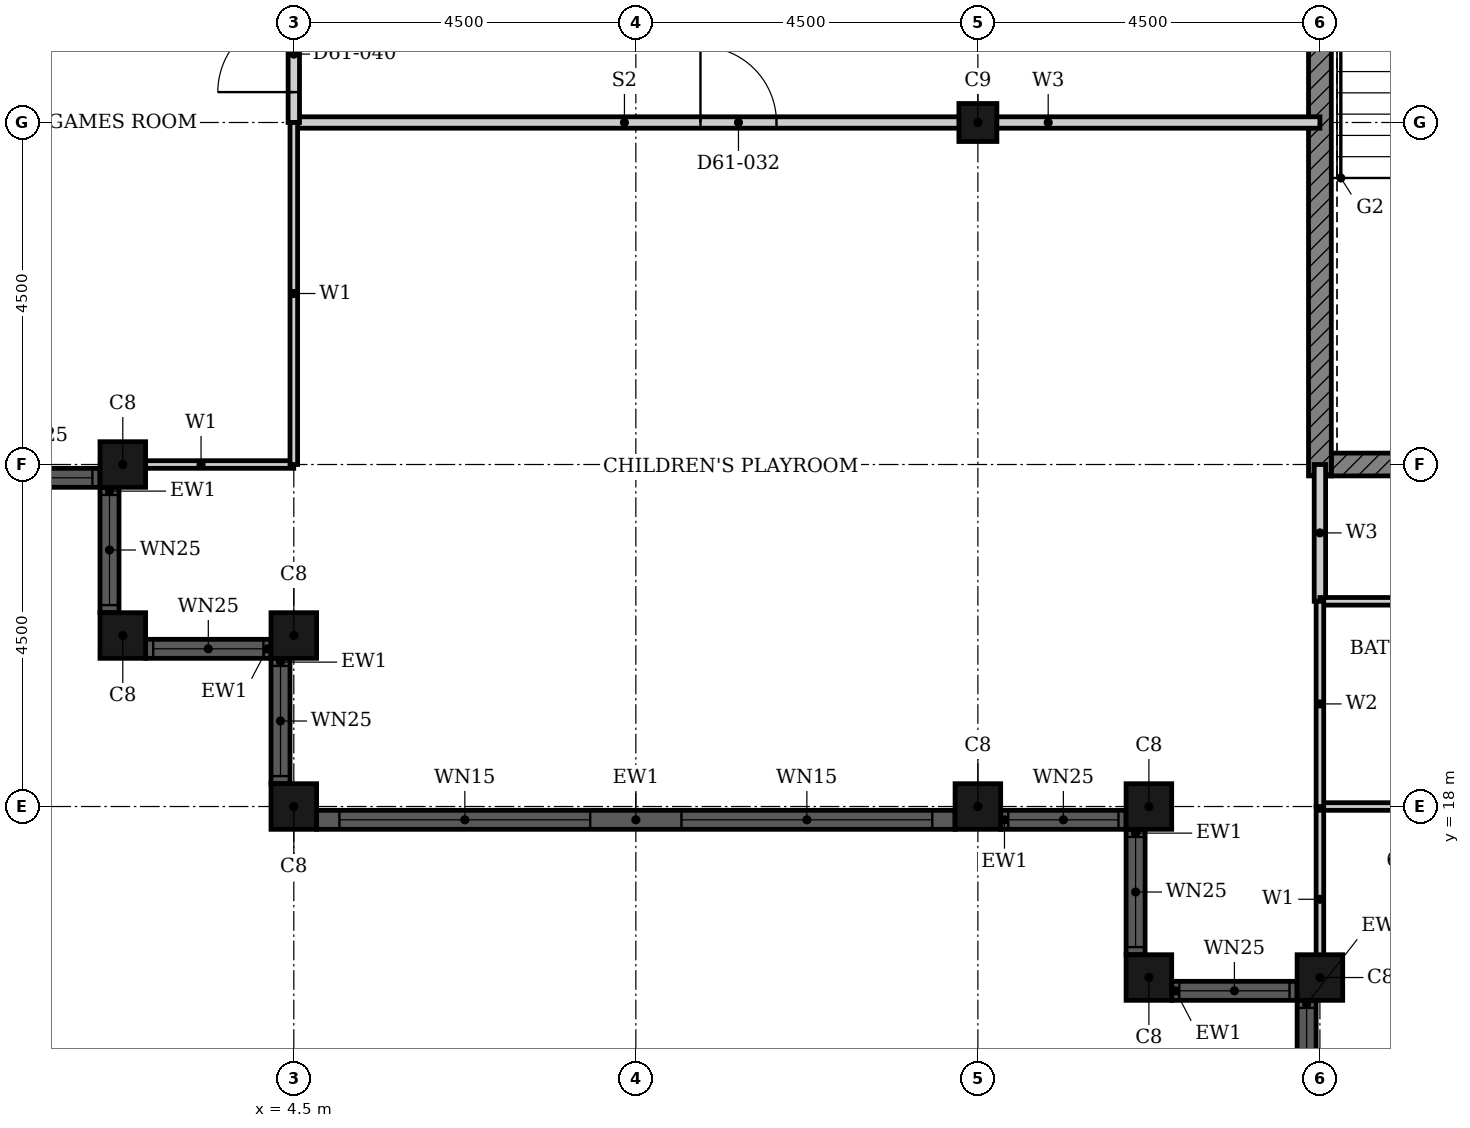
"""IFC4 building model, lengths in metres.
Left out: names, types, materials, properties, quantities, classifications, styles, units other than length and angle.
Written with IfcOpenShell. Run it as: python <this file> out.ifc"""

import sys

from ifc_helpers import new_model, si_unit, direction, frame, frame_2d, origin, origin_2d, place, context, subcontext, project, spatial, rectangle, hollow_rectangle, extrude, element, fill, save


model = new_model("IFC4")
c1 = context("Model", 3, precision=1e-05, world=origin(), true_north=direction((0.0, 1.0)))
c2 = subcontext(c1, "Body", "Model", "MODEL_VIEW")
j1 = project(units=[si_unit("LENGTHUNIT", "METRE"), si_unit("PLANEANGLEUNIT", "RADIAN")], contexts=[c1])
p1 = place(None, origin())
s1 = spatial("IfcSite", under=j1, at=p1, CompositionType="ELEMENT")
p2 = place(p1, origin())
s2 = spatial("IfcBuilding", under=s1, at=p2, CompositionType="ELEMENT")
p3 = place(p2, frame((0.0, 0.0, 241.6)))
s3 = spatial("IfcBuildingStorey", under=s2, at=p3, CompositionType="ELEMENT", Elevation=241.6)
for number, where, z_axis, x_axis in (
    (1, (15.75, 18.0, 0.0), (0.0, 0.0, 1.0), (1.0, 0.0, 0.0)),
    (2, (15.75, 15.75, 0.0), (0.0, 0.0, 1.0), (1.0, 0.0, 0.0)),
    (3, (18.0, 15.75, 0.0), (0.0, 0.0, 1.0), (1.0, 0.0, 0.0)),
    (4, (2.25, 22.5, 0.0), (0.0, 0.0, 1.0), (1.0, 0.0, 0.0)),
    (5, (2.25, 20.25, 0.0), (0.0, 0.0, 1.0), (1.0, 0.0, 0.0)),
    (6, (4.5, 20.25, 0.0), (0.0, 0.0, 1.0), (1.0, 0.0, 0.0)),
    (7, (4.5, 18.0, 0.0), (0.0, 0.0, 1.0), (1.0, 0.0, 0.0)),
    (8, (13.5, 18.0, 0.0), (0.0, 0.0, 1.0), (1.0, 0.0, 0.0)),
):
    element("IfcColumn", number, at=place(p3, frame(where, z_axis=z_axis, x_axis=x_axis)), inside=s3, PredefinedType="COLUMN", context=c2, shape_type="SweptSolid", body=[
        extrude(hollow_rectangle(XDim=0.6, YDim=0.6, WallThickness=0.02, at=origin_2d()), origin(), (0.0, 0.0, 1.0), 3.7),
    ])
p4 = place(p3, frame((13.5, 27.0, 0.0), z_axis=(0.0, 0.0, 1.0), x_axis=(1.0, 0.0, 0.0)))
e9 = element("IfcColumn", 9, at=p4, inside=s3, PredefinedType="COLUMN", context=c2, shape_type="SweptSolid", body=[
    extrude(hollow_rectangle(XDim=0.5, YDim=0.5, WallThickness=0.016, InnerFilletRadius=0.032, OuterFilletRadius=0.048, at=origin_2d()), origin(), (0.0, 0.0, 1.0), 3.7),
])
p5 = place(p3, frame((15.575, 17.7, 0.0), z_axis=(0.0, 0.0, 1.0), x_axis=(0.0, -1.0, 0.0)))
e10 = element("IfcWall", 10, at=p5, inside=s3, PredefinedType="SOLIDWALL", context=c2, shape_type="SweptSolid", body=[
    extrude(rectangle(XDim=1.65, YDim=0.25, at=frame_2d((0.825, 0.0))), origin(), (0.0, 0.0, 1.0), 3.7),
])
p6 = place(p5, frame((0.1, 0.0, 0.9)))
e11 = element("IfcOpeningElement", 11, at=p6, cuts=e10, PredefinedType="OPENING", context=c2, shape_type="SweptSolid", body=[
    extrude(rectangle(XDim=1.45, YDim=1.85, at=frame_2d((0.725, 0.925))), frame((0.0, 0.135, 0.0), z_axis=(0.0, -1.0, 0.0), x_axis=(1.0, 0.0, 0.0)), (0.0, 0.0, 1.0), 0.27),
])
p7 = place(p3, frame((16.05, 15.575, 0.0), z_axis=(0.0, 0.0, 1.0), x_axis=(1.0, 0.0, 0.0)))
e12 = element("IfcWall", 12, at=p7, inside=s3, PredefinedType="SOLIDWALL", context=c2, shape_type="SweptSolid", body=[
    extrude(rectangle(XDim=1.65, YDim=0.25, at=frame_2d((0.825, 0.0))), origin(), (0.0, 0.0, 1.0), 3.7),
])
p8 = place(p7, frame((0.1, 0.0, 0.9)))
e13 = element("IfcOpeningElement", 13, at=p8, cuts=e12, PredefinedType="OPENING", context=c2, shape_type="SweptSolid", body=[
    extrude(rectangle(XDim=1.45, YDim=1.85, at=frame_2d((0.725, 0.925))), frame((0.0, 0.135, 0.0), z_axis=(0.0, -1.0, 0.0), x_axis=(1.0, 0.0, 0.0)), (0.0, 0.0, 1.0), 0.27),
])
p9 = place(p3, frame((17.825, 15.45, 0.0), z_axis=(0.0, 0.0, 1.0), x_axis=(0.0, -1.0, 0.0)))
e14 = element("IfcWall", 14, at=p9, inside=s3, PredefinedType="SOLIDWALL", context=c2, shape_type="SweptSolid", body=[
    extrude(rectangle(XDim=1.65, YDim=0.25, at=frame_2d((0.825, 0.0))), origin(), (0.0, 0.0, 1.0), 3.7),
])
p10 = place(p9, frame((0.1, 0.0, 0.9)))
e15 = element("IfcOpeningElement", 15, at=p10, cuts=e14, PredefinedType="OPENING", context=c2, shape_type="SweptSolid", body=[
    extrude(rectangle(XDim=1.45, YDim=1.85, at=frame_2d((0.725, 0.925))), frame((0.0, 0.135, 0.0), z_axis=(0.0, -1.0, 0.0), x_axis=(1.0, 0.0, 0.0)), (0.0, 0.0, 1.0), 0.27),
])
p11 = place(p3, frame((0.3, 22.325, 0.0), z_axis=(0.0, 0.0, 1.0), x_axis=(1.0, 0.0, 0.0)))
e16 = element("IfcWall", 16, at=p11, inside=s3, PredefinedType="SOLIDWALL", context=c2, shape_type="SweptSolid", body=[
    extrude(rectangle(XDim=1.65, YDim=0.25, at=frame_2d((0.825, 0.0))), origin(), (0.0, 0.0, 1.0), 3.7),
])
p12 = place(p11, frame((0.1, 0.0, 0.9)))
e17 = element("IfcOpeningElement", 17, at=p12, cuts=e16, PredefinedType="OPENING", context=c2, shape_type="SweptSolid", body=[
    extrude(rectangle(XDim=1.45, YDim=1.85, at=frame_2d((0.725, 0.925))), frame((0.0, 0.135, 0.0), z_axis=(0.0, -1.0, 0.0), x_axis=(1.0, 0.0, 0.0)), (0.0, 0.0, 1.0), 0.27),
])
p13 = place(p3, frame((2.075, 22.2, 0.0), z_axis=(0.0, 0.0, 1.0), x_axis=(0.0, -1.0, 0.0)))
e18 = element("IfcWall", 18, at=p13, inside=s3, PredefinedType="SOLIDWALL", context=c2, shape_type="SweptSolid", body=[
    extrude(rectangle(XDim=1.65, YDim=0.25, at=frame_2d((0.825, 0.0))), origin(), (0.0, 0.0, 1.0), 3.7),
])
p14 = place(p13, frame((0.1, 0.0, 0.9)))
e19 = element("IfcOpeningElement", 19, at=p14, cuts=e18, PredefinedType="OPENING", context=c2, shape_type="SweptSolid", body=[
    extrude(rectangle(XDim=1.45, YDim=1.85, at=frame_2d((0.725, 0.925))), frame((0.0, 0.135, 0.0), z_axis=(0.0, -1.0, 0.0), x_axis=(1.0, 0.0, 0.0)), (0.0, 0.0, 1.0), 0.27),
])
p15 = place(p3, frame((2.55, 20.075, 0.0), z_axis=(0.0, 0.0, 1.0), x_axis=(1.0, 0.0, 0.0)))
e20 = element("IfcWall", 20, at=p15, inside=s3, PredefinedType="SOLIDWALL", context=c2, shape_type="SweptSolid", body=[
    extrude(rectangle(XDim=1.65, YDim=0.25, at=frame_2d((0.825, 0.0))), origin(), (0.0, 0.0, 1.0), 3.7),
])
p16 = place(p15, frame((0.1, 0.0, 0.9)))
e21 = element("IfcOpeningElement", 21, at=p16, cuts=e20, PredefinedType="OPENING", context=c2, shape_type="SweptSolid", body=[
    extrude(rectangle(XDim=1.45, YDim=1.85, at=frame_2d((0.725, 0.925))), frame((0.0, 0.135, 0.0), z_axis=(0.0, -1.0, 0.0), x_axis=(1.0, 0.0, 0.0)), (0.0, 0.0, 1.0), 0.27),
])
p17 = place(p3, frame((4.325, 19.95, 0.0), z_axis=(0.0, 0.0, 1.0), x_axis=(0.0, -1.0, 0.0)))
e22 = element("IfcWall", 22, at=p17, inside=s3, PredefinedType="SOLIDWALL", context=c2, shape_type="SweptSolid", body=[
    extrude(rectangle(XDim=1.65, YDim=0.25, at=frame_2d((0.825, 0.0))), origin(), (0.0, 0.0, 1.0), 3.7),
])
p18 = place(p17, frame((0.1, 0.0, 0.9)))
e23 = element("IfcOpeningElement", 23, at=p18, cuts=e22, PredefinedType="OPENING", context=c2, shape_type="SweptSolid", body=[
    extrude(rectangle(XDim=1.45, YDim=1.85, at=frame_2d((0.725, 0.925))), frame((0.0, 0.135, 0.0), z_axis=(0.0, -1.0, 0.0), x_axis=(1.0, 0.0, 0.0)), (0.0, 0.0, 1.0), 0.27),
])
p19 = place(p3, frame((4.8, 17.825, 0.0), z_axis=(0.0, 0.0, 1.0), x_axis=(1.0, 0.0, 0.0)))
e24 = element("IfcWall", 24, at=p19, inside=s3, PredefinedType="SOLIDWALL", context=c2, shape_type="SweptSolid", body=[
    extrude(rectangle(XDim=8.4, YDim=0.25, at=frame_2d((4.2, 0.0))), origin(), (0.0, 0.0, 1.0), 3.7),
])
p20 = place(p19, frame((0.3, 0.0, 0.45)))
e25 = element("IfcOpeningElement", 25, at=p20, cuts=e24, PredefinedType="OPENING", context=c2, shape_type="SweptSolid", body=[
    extrude(rectangle(XDim=3.3, YDim=2.3, at=frame_2d((1.65, 1.15))), frame((0.0, 0.135, 0.0), z_axis=(0.0, -1.0, 0.0), x_axis=(1.0, 0.0, 0.0)), (0.0, 0.0, 1.0), 0.27),
])
p21 = place(p19, frame((4.8, 0.0, 0.45)))
e26 = element("IfcOpeningElement", 26, at=p21, cuts=e24, PredefinedType="OPENING", context=c2, shape_type="SweptSolid", body=[
    extrude(rectangle(XDim=3.3, YDim=2.3, at=frame_2d((1.65, 1.15))), frame((0.0, 0.135, 0.0), z_axis=(0.0, -1.0, 0.0), x_axis=(1.0, 0.0, 0.0)), (0.0, 0.0, 1.0), 0.27),
])
p22 = place(p3, frame((13.8, 17.825, 0.0), z_axis=(0.0, 0.0, 1.0), x_axis=(1.0, 0.0, 0.0)))
e27 = element("IfcWall", 27, at=p22, inside=s3, PredefinedType="SOLIDWALL", context=c2, shape_type="SweptSolid", body=[
    extrude(rectangle(XDim=1.65, YDim=0.25, at=frame_2d((0.825, 0.0))), origin(), (0.0, 0.0, 1.0), 3.7),
])
p23 = place(p22, frame((0.1, 0.0, 0.9)))
e28 = element("IfcOpeningElement", 28, at=p23, cuts=e27, PredefinedType="OPENING", context=c2, shape_type="SweptSolid", body=[
    extrude(rectangle(XDim=1.45, YDim=1.85, at=frame_2d((0.725, 0.925))), frame((0.0, 0.135, 0.0), z_axis=(0.0, -1.0, 0.0), x_axis=(1.0, 0.0, 0.0)), (0.0, 0.0, 1.0), 0.27),
])
p24 = place(p3, frame((18.15, 22.5, 0.0), z_axis=(0.0, 0.0, 1.0), x_axis=(1.0, 0.0, 0.0)))
e29 = element("IfcWall", 29, at=p24, inside=s3, PredefinedType="SHEAR", context=c2, shape_type="SweptSolid", body=[
    extrude(rectangle(XDim=4.225, YDim=0.3, at=frame_2d((2.113, 0.0))), origin(), (0.0, 0.0, 1.0), 3.4),
])
p25 = place(p3, frame((18.0, 22.35, 0.0), z_axis=(0.0, 0.0, 1.0), x_axis=(0.0, 1.0, 0.0)))
e30 = element("IfcWall", 30, at=p25, inside=s3, PredefinedType="SHEAR", context=c2, shape_type="SweptSolid", body=[
    extrude(rectangle(XDim=9.3, YDim=0.3, at=frame_2d((4.65, 0.0))), origin(), (0.0, 0.0, 1.0), 3.4),
])
p26 = place(p3, frame((4.5, 27.0, 0.0), z_axis=(0.0, 0.0, 1.0), x_axis=(1.0, 0.0, 0.0)))
e31 = element("IfcWall", 31, at=p26, inside=s3, PredefinedType="PARTITIONING", context=c2, shape_type="SweptSolid", body=[
    extrude(rectangle(XDim=13.5, YDim=0.15, at=frame_2d((6.75, 0.0))), origin(), (0.0, 0.0, 1.0), 2.68),
])
p27 = place(p26, frame((5.35, 0.0, 0.0)))
e32 = element("IfcOpeningElement", 32, at=p27, cuts=e31, PredefinedType="OPENING", context=c2, shape_type="SweptSolid", body=[
    extrude(rectangle(XDim=1.0, YDim=2.1, at=frame_2d((0.5, 1.05))), frame((0.0, 0.085, 0.0), z_axis=(0.0, -1.0, 0.0), x_axis=(1.0, 0.0, 0.0)), (0.0, 0.0, 1.0), 0.17),
])
p28 = place(p3, frame((18.0, 20.7, 0.0), z_axis=(0.0, 0.0, 1.0), x_axis=(0.0, 1.0, 0.0)))
e33 = element("IfcWall", 33, at=p28, inside=s3, PredefinedType="PARTITIONING", context=c2, shape_type="SweptSolid", body=[
    extrude(rectangle(XDim=1.8, YDim=0.15, at=frame_2d((0.9, 0.0))), origin(), (0.0, 0.0, 1.0), 3.4),
])
p29 = place(p3, frame((4.5, 27.0, 0.0), z_axis=(0.0, 0.0, 1.0), x_axis=(0.0, 1.0, 0.0)))
e34 = element("IfcWall", 34, at=p29, inside=s3, PredefinedType="PARTITIONING", context=c2, shape_type="SweptSolid", body=[
    extrude(rectangle(XDim=1.8, YDim=0.15, at=frame_2d((0.9, 0.0))), origin(), (0.0, 0.0, 1.0), 3.4),
])
p30 = place(p29, frame((0.4, 0.0, 0.0)))
e35 = element("IfcOpeningElement", 35, at=p30, cuts=e34, PredefinedType="OPENING", context=c2, shape_type="SweptSolid", body=[
    extrude(rectangle(XDim=1.0, YDim=2.1, at=frame_2d((0.5, 1.05))), frame((0.0, 0.085, 0.0), z_axis=(0.0, -1.0, 0.0), x_axis=(1.0, 0.0, 0.0)), (0.0, 0.0, 1.0), 0.17),
])
p31 = place(p3, frame((2.06, 22.5, 0.0), z_axis=(0.0, 0.0, 1.0), x_axis=(1.0, 0.0, 0.0)))
e36 = element("IfcWall", 36, at=p31, inside=s3, PredefinedType="PARTITIONING", context=c2, shape_type="SweptSolid", body=[
    extrude(rectangle(XDim=2.439, YDim=0.1, at=frame_2d((1.219, 0.0))), origin(), (0.0, 0.0, 1.0), 2.68),
])
p32 = place(p3, frame((18.0, 15.56, 0.0), z_axis=(0.0, 0.0, 1.0), x_axis=(0.0, 1.0, 0.0)))
e37 = element("IfcWall", 37, at=p32, inside=s3, PredefinedType="PARTITIONING", context=c2, shape_type="SweptSolid", body=[
    extrude(rectangle(XDim=2.439, YDim=0.1, at=frame_2d((1.219, 0.0))), origin(), (0.0, 0.0, 1.0), 3.4),
])
p33 = place(p3, frame((4.5, 22.5, 0.0), z_axis=(0.0, 0.0, 1.0), x_axis=(0.0, 1.0, 0.0)))
e38 = element("IfcWall", 38, at=p33, inside=s3, PredefinedType="PARTITIONING", context=c2, shape_type="SweptSolid", body=[
    extrude(rectangle(XDim=4.5, YDim=0.1, at=frame_2d((2.25, 0.0))), origin(), (0.0, 0.0, 1.0), 3.4),
])
for number, where, z_axis, x_axis in (
    (39, (18.0, 18.0, 0.0), (0.0, 0.0, 1.0), (1.0, 0.0, 0.0)),
    (40, (18.0, 20.7, 0.0), (0.0, 0.0, 1.0), (1.0, 0.0, 0.0)),
):
    element("IfcWall", number, at=place(p3, frame(where, z_axis=z_axis, x_axis=x_axis)), inside=s3, PredefinedType="PARTITIONING", context=c2, shape_type="SweptSolid", body=[
        extrude(rectangle(XDim=2.4, YDim=0.1, at=frame_2d((1.2, 0.0))), origin(), (0.0, 0.0, 1.0), 3.4),
    ])
p34 = place(p3, frame((18.0, 18.0, 0.0), z_axis=(0.0, 0.0, 1.0), x_axis=(0.0, 1.0, 0.0)))
e41 = element("IfcWall", 41, at=p34, inside=s3, PredefinedType="PARTITIONING", context=c2, shape_type="SweptSolid", body=[
    extrude(rectangle(XDim=2.7, YDim=0.1, at=frame_2d((1.35, 0.0))), origin(), (0.0, 0.0, 1.0), 3.4),
])
p35 = place(p6, origin())
e42 = element("IfcWindow", 42, at=p35, inside=s3, PartitioningType="SINGLE_PANEL", PredefinedType="WINDOW", context=c2, shape_type="SweptSolid", body=[
    extrude(rectangle(XDim=1.45, YDim=1.85, at=frame_2d((0.725, 0.925))), frame((0.0, 0.03, 0.0), z_axis=(0.0, -1.0, 0.0), x_axis=(1.0, 0.0, 0.0)), (0.0, 0.0, 1.0), 0.06),
])
fill(e11, e42)
p36 = place(p8, origin())
e43 = element("IfcWindow", 43, at=p36, inside=s3, PartitioningType="SINGLE_PANEL", PredefinedType="WINDOW", context=c2, shape_type="SweptSolid", body=[
    extrude(rectangle(XDim=1.45, YDim=1.85, at=frame_2d((0.725, 0.925))), frame((0.0, 0.03, 0.0), z_axis=(0.0, -1.0, 0.0), x_axis=(1.0, 0.0, 0.0)), (0.0, 0.0, 1.0), 0.06),
])
fill(e13, e43)
p37 = place(p10, origin())
e44 = element("IfcWindow", 44, at=p37, inside=s3, PartitioningType="SINGLE_PANEL", PredefinedType="WINDOW", context=c2, shape_type="SweptSolid", body=[
    extrude(rectangle(XDim=1.45, YDim=1.85, at=frame_2d((0.725, 0.925))), frame((0.0, 0.03, 0.0), z_axis=(0.0, -1.0, 0.0), x_axis=(1.0, 0.0, 0.0)), (0.0, 0.0, 1.0), 0.06),
])
fill(e15, e44)
p38 = place(p12, origin())
e45 = element("IfcWindow", 45, at=p38, inside=s3, PartitioningType="SINGLE_PANEL", PredefinedType="WINDOW", context=c2, shape_type="SweptSolid", body=[
    extrude(rectangle(XDim=1.45, YDim=1.85, at=frame_2d((0.725, 0.925))), frame((0.0, 0.03, 0.0), z_axis=(0.0, -1.0, 0.0), x_axis=(1.0, 0.0, 0.0)), (0.0, 0.0, 1.0), 0.06),
])
fill(e17, e45)
p39 = place(p14, origin())
e46 = element("IfcWindow", 46, at=p39, inside=s3, PartitioningType="SINGLE_PANEL", PredefinedType="WINDOW", context=c2, shape_type="SweptSolid", body=[
    extrude(rectangle(XDim=1.45, YDim=1.85, at=frame_2d((0.725, 0.925))), frame((0.0, 0.03, 0.0), z_axis=(0.0, -1.0, 0.0), x_axis=(1.0, 0.0, 0.0)), (0.0, 0.0, 1.0), 0.06),
])
fill(e19, e46)
p40 = place(p16, origin())
e47 = element("IfcWindow", 47, at=p40, inside=s3, PartitioningType="SINGLE_PANEL", PredefinedType="WINDOW", context=c2, shape_type="SweptSolid", body=[
    extrude(rectangle(XDim=1.45, YDim=1.85, at=frame_2d((0.725, 0.925))), frame((0.0, 0.03, 0.0), z_axis=(0.0, -1.0, 0.0), x_axis=(1.0, 0.0, 0.0)), (0.0, 0.0, 1.0), 0.06),
])
fill(e21, e47)
p41 = place(p18, origin())
e48 = element("IfcWindow", 48, at=p41, inside=s3, PartitioningType="SINGLE_PANEL", PredefinedType="WINDOW", context=c2, shape_type="SweptSolid", body=[
    extrude(rectangle(XDim=1.45, YDim=1.85, at=frame_2d((0.725, 0.925))), frame((0.0, 0.03, 0.0), z_axis=(0.0, -1.0, 0.0), x_axis=(1.0, 0.0, 0.0)), (0.0, 0.0, 1.0), 0.06),
])
fill(e23, e48)
p42 = place(p20, origin())
e49 = element("IfcWindow", 49, at=p42, inside=s3, PartitioningType="SINGLE_PANEL", PredefinedType="WINDOW", context=c2, shape_type="SweptSolid", body=[
    extrude(rectangle(XDim=3.3, YDim=2.3, at=frame_2d((1.65, 1.15))), frame((0.0, 0.03, 0.0), z_axis=(0.0, -1.0, 0.0), x_axis=(1.0, 0.0, 0.0)), (0.0, 0.0, 1.0), 0.06),
])
fill(e25, e49)
p43 = place(p21, origin())
e50 = element("IfcWindow", 50, at=p43, inside=s3, PartitioningType="SINGLE_PANEL", PredefinedType="WINDOW", context=c2, shape_type="SweptSolid", body=[
    extrude(rectangle(XDim=3.3, YDim=2.3, at=frame_2d((1.65, 1.15))), frame((0.0, 0.03, 0.0), z_axis=(0.0, -1.0, 0.0), x_axis=(1.0, 0.0, 0.0)), (0.0, 0.0, 1.0), 0.06),
])
fill(e26, e50)
p44 = place(p23, origin())
e51 = element("IfcWindow", 51, at=p44, inside=s3, PartitioningType="SINGLE_PANEL", PredefinedType="WINDOW", context=c2, shape_type="SweptSolid", body=[
    extrude(rectangle(XDim=1.45, YDim=1.85, at=frame_2d((0.725, 0.925))), frame((0.0, 0.03, 0.0), z_axis=(0.0, -1.0, 0.0), x_axis=(1.0, 0.0, 0.0)), (0.0, 0.0, 1.0), 0.06),
])
fill(e28, e51)
p45 = place(p27, origin())
e52 = element("IfcDoor", 52, at=p45, inside=s3, OperationType="SINGLE_SWING_LEFT", PredefinedType="DOOR", context=c2, shape_type="SweptSolid", body=[
    extrude(rectangle(XDim=1.0, YDim=2.1, at=frame_2d((0.5, 1.05))), frame((0.0, 0.025, 0.0), z_axis=(0.0, -1.0, 0.0), x_axis=(1.0, 0.0, 0.0)), (0.0, 0.0, 1.0), 0.05),
])
fill(e32, e52)
p46 = place(p30, origin())
e53 = element("IfcDoor", 53, at=p46, inside=s3, OperationType="SINGLE_SWING_LEFT", PredefinedType="DOOR", context=c2, shape_type="SweptSolid", body=[
    extrude(rectangle(XDim=1.0, YDim=2.1, at=frame_2d((0.5, 1.05))), frame((0.0, 0.025, 0.0), z_axis=(0.0, -1.0, 0.0), x_axis=(1.0, 0.0, 0.0)), (0.0, 0.0, 1.0), 0.05),
])
fill(e35, e53)
save(model, sys.argv[1])
